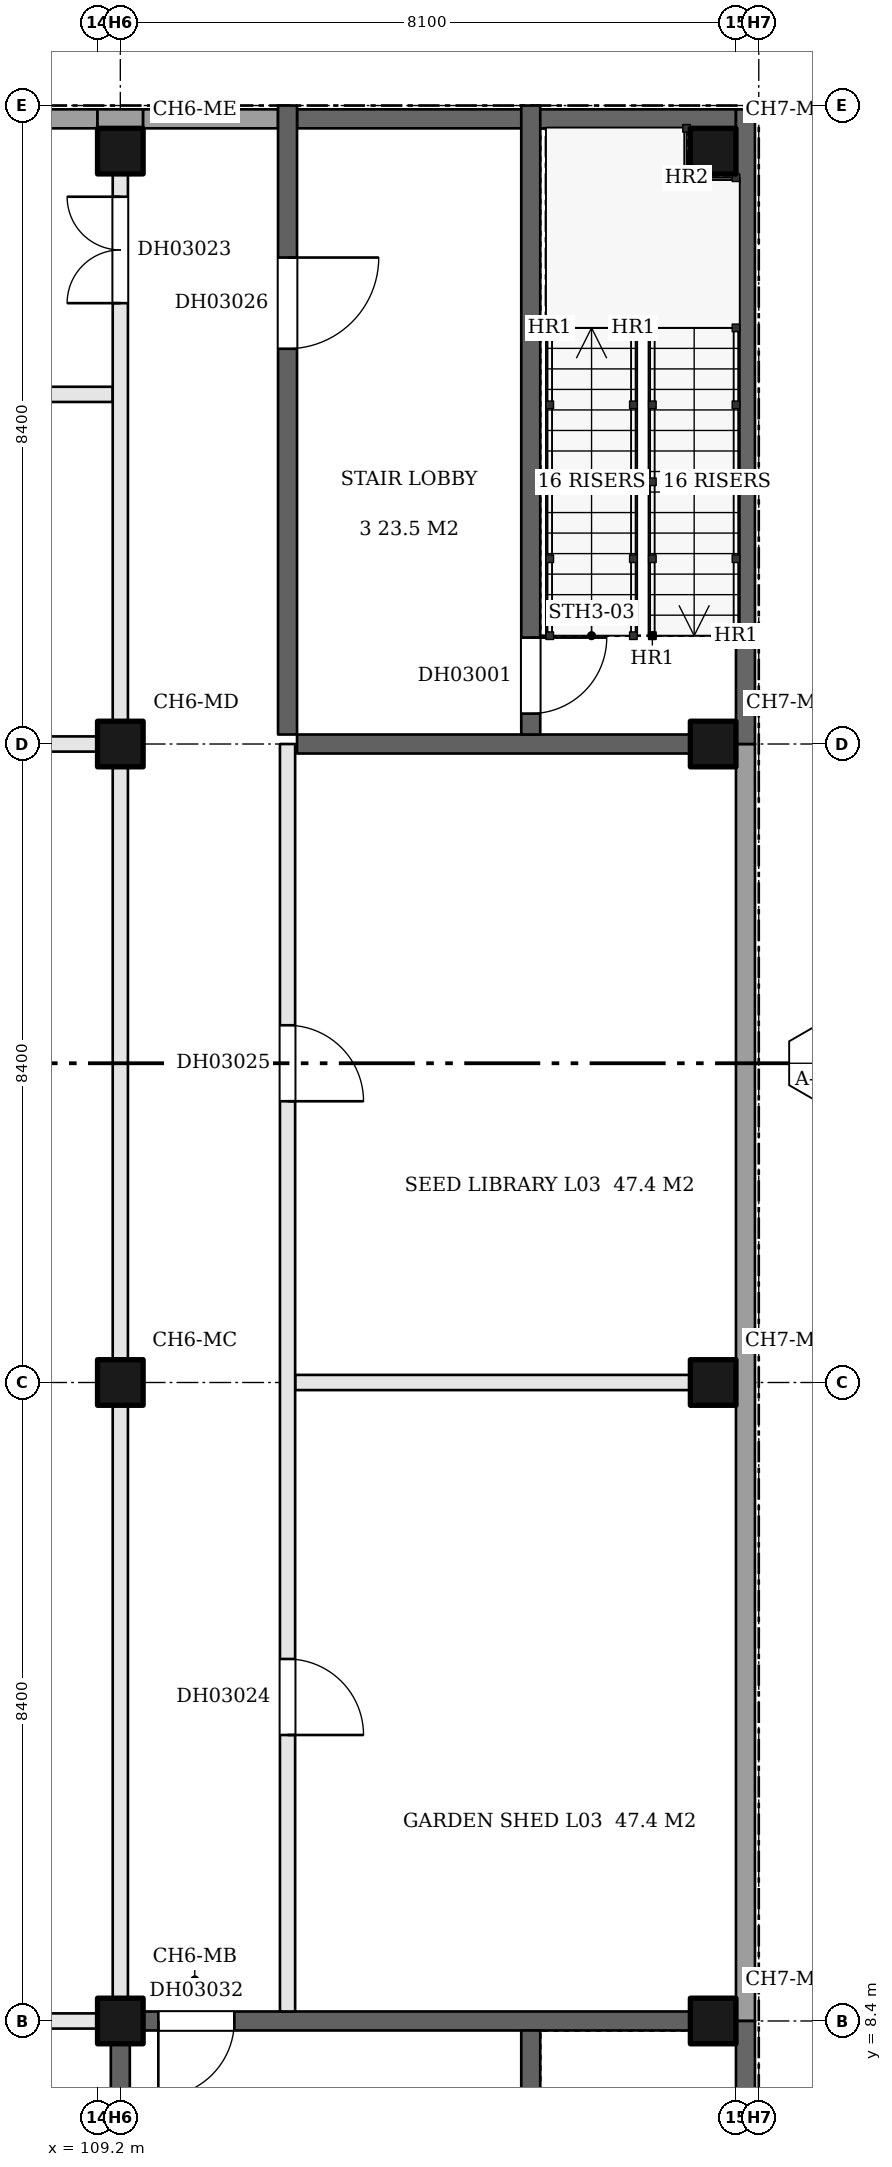
"""IFC4 building model, lengths in metres.
Left out: names, types, materials, properties, quantities, classifications, styles, units other than length and angle.
Written with IfcOpenShell. Run it as: python <this file> out.ifc"""

import sys

from ifc_helpers import new_model, si_unit, direction, frame, frame_2d, origin, origin_2d, place, context, subcontext, project, spatial, rectangle, extrude, element, fill, save


model = new_model("IFC4")
c1 = context("Model", 3, precision=1e-05, world=origin(), true_north=direction((0.0, 1.0)))
c2 = subcontext(c1, "Body", "Model", "MODEL_VIEW")
j1 = project(units=[si_unit("LENGTHUNIT", "METRE"), si_unit("PLANEANGLEUNIT", "RADIAN")], contexts=[c1])
p1 = place(None, origin())
s1 = spatial("IfcSite", under=j1, at=p1, CompositionType="ELEMENT")
p2 = place(p1, origin())
s2 = spatial("IfcBuilding", under=s1, at=p2, CompositionType="ELEMENT")
p3 = place(p2, frame((0.0, 0.0, 19.8)))
s3 = spatial("IfcBuildingStorey", under=s2, at=p3, CompositionType="ELEMENT", Elevation=19.8)
for number, where, z_axis, x_axis in (
    (1, (109.5, 8.4, 0.0), (0.0, 0.0, 1.0), (1.0, 0.0, 0.0)),
    (2, (109.5, 16.8, 0.0), (0.0, 0.0, 1.0), (1.0, 0.0, 0.0)),
    (3, (109.5, 25.2, 0.0), (0.0, 0.0, 1.0), (1.0, 0.0, 0.0)),
    (4, (109.5, 33.0, 0.0), (0.0, 0.0, 1.0), (1.0, 0.0, 0.0)),
    (5, (117.3, 8.4, 0.0), (0.0, 0.0, 1.0), (1.0, 0.0, 0.0)),
    (6, (117.3, 16.8, 0.0), (0.0, 0.0, 1.0), (1.0, 0.0, 0.0)),
    (7, (117.3, 25.2, 0.0), (0.0, 0.0, 1.0), (1.0, 0.0, 0.0)),
    (8, (117.3, 33.0, 0.0), (0.0, 0.0, 1.0), (1.0, 0.0, 0.0)),
):
    element("IfcColumn", number, at=place(p3, frame(where, z_axis=z_axis, x_axis=x_axis)), inside=s3, PredefinedType="COLUMN", context=c2, shape_type="SweptSolid", body=[
        extrude(rectangle(XDim=0.6, YDim=0.6, at=origin_2d()), origin(), (0.0, 0.0, 1.0), 5.0),
    ])
p4 = place(p3, frame((101.4, 8.4, 0.0), z_axis=(0.0, 0.0, 1.0), x_axis=(1.0, 0.0, 0.0)))
e9 = element("IfcWall", 9, at=p4, inside=s3, PredefinedType="PARTITIONING", context=c2, shape_type="SweptSolid", body=[
    extrude(rectangle(XDim=7.8, YDim=0.2, at=frame_2d((3.9, 0.0))), origin(), (0.0, 0.0, 1.0), 5.0),
])
p5 = place(p4, frame((2.2, 0.0, 0.0)))
e10 = element("IfcOpeningElement", 10, at=p5, cuts=e9, PredefinedType="OPENING", context=c2, shape_type="SweptSolid", body=[
    extrude(rectangle(XDim=1.0, YDim=2.1, at=frame_2d((0.5, 1.05))), frame((0.0, 0.11, 0.0), z_axis=(0.0, -1.0, 0.0), x_axis=(1.0, 0.0, 0.0)), (0.0, 0.0, 1.0), 0.22),
])
p6 = place(p4, frame((5.2, 0.0, 0.0)))
e11 = element("IfcOpeningElement", 11, at=p6, cuts=e9, PredefinedType="OPENING", context=c2, shape_type="SweptSolid", body=[
    extrude(rectangle(XDim=1.0, YDim=2.1, at=frame_2d((0.5, 1.05))), frame((0.0, 0.11, 0.0), z_axis=(0.0, -1.0, 0.0), x_axis=(1.0, 0.0, 0.0)), (0.0, 0.0, 1.0), 0.22),
])
p7 = place(p3, frame((109.8, 8.4, 0.0), z_axis=(0.0, 0.0, 1.0), x_axis=(1.0, 0.0, 0.0)))
e12 = element("IfcWall", 12, at=p7, inside=s3, PredefinedType="SHEAR", context=c2, shape_type="SweptSolid", body=[
    extrude(rectangle(XDim=7.2, YDim=0.25, at=frame_2d((3.6, 0.0))), origin(), (0.0, 0.0, 1.0), 5.0),
])
p8 = place(p7, frame((0.2, 0.0, 0.0)))
e13 = element("IfcOpeningElement", 13, at=p8, cuts=e12, PredefinedType="OPENING", context=c2, shape_type="SweptSolid", body=[
    extrude(rectangle(XDim=1.0, YDim=2.1, at=frame_2d((0.5, 1.05))), frame((0.0, 0.135, 0.0), z_axis=(0.0, -1.0, 0.0), x_axis=(1.0, 0.0, 0.0)), (0.0, 0.0, 1.0), 0.27),
])
p9 = place(p3, frame((111.8, 16.8, 0.0), z_axis=(0.0, 0.0, 1.0), x_axis=(1.0, 0.0, 0.0)))
e14 = element("IfcWall", 14, at=p9, inside=s3, PredefinedType="PARTITIONING", context=c2, shape_type="SweptSolid", body=[
    extrude(rectangle(XDim=5.2, YDim=0.2, at=frame_2d((2.6, 0.0))), origin(), (0.0, 0.0, 1.0), 5.0),
])
p10 = place(p3, frame((101.4, 25.2, 0.0), z_axis=(0.0, 0.0, 1.0), x_axis=(1.0, 0.0, 0.0)))
e15 = element("IfcWall", 15, at=p10, inside=s3, PredefinedType="PARTITIONING", context=c2, shape_type="SweptSolid", body=[
    extrude(rectangle(XDim=7.8, YDim=0.2, at=frame_2d((3.9, 0.0))), origin(), (0.0, 0.0, 1.0), 5.0),
])
p11 = place(p3, frame((111.825, 25.2, 0.0), z_axis=(0.0, 0.0, 1.0), x_axis=(1.0, 0.0, 0.0)))
e16 = element("IfcWall", 16, at=p11, inside=s3, PredefinedType="SHEAR", context=c2, shape_type="SweptSolid", body=[
    extrude(rectangle(XDim=5.175, YDim=0.25, at=frame_2d((2.587, 0.0))), origin(), (0.0, 0.0, 1.0), 5.0),
])
p12 = place(p3, frame((76.025, 29.8, 0.0), z_axis=(0.0, 0.0, 1.0), x_axis=(1.0, 0.0, 0.0)))
e17 = element("IfcWall", 17, at=p12, inside=s3, PredefinedType="PARTITIONING", context=c2, shape_type="SweptSolid", body=[
    extrude(rectangle(XDim=33.375, YDim=0.2, at=frame_2d((16.688, 0.0))), origin(), (0.0, 0.0, 1.0), 5.0),
])
p13 = place(p12, frame((1.538, 0.0, 0.0)))
e18 = element("IfcOpeningElement", 18, at=p13, cuts=e17, PredefinedType="OPENING", context=c2, shape_type="SweptSolid", body=[
    extrude(rectangle(XDim=1.0, YDim=2.1, at=frame_2d((0.5, 1.05))), frame((0.0, 0.11, 0.0), z_axis=(0.0, -1.0, 0.0), x_axis=(1.0, 0.0, 0.0)), (0.0, 0.0, 1.0), 0.22),
])
p14 = place(p12, frame((5.675, 0.0, 0.0)))
e19 = element("IfcOpeningElement", 19, at=p14, cuts=e17, PredefinedType="OPENING", context=c2, shape_type="SweptSolid", body=[
    extrude(rectangle(XDim=1.0, YDim=2.1, at=frame_2d((0.5, 1.05))), frame((0.0, 0.11, 0.0), z_axis=(0.0, -1.0, 0.0), x_axis=(1.0, 0.0, 0.0)), (0.0, 0.0, 1.0), 0.22),
])
p15 = place(p12, frame((9.175, 0.0, 0.0)))
e20 = element("IfcOpeningElement", 20, at=p15, cuts=e17, PredefinedType="OPENING", context=c2, shape_type="SweptSolid", body=[
    extrude(rectangle(XDim=1.0, YDim=2.1, at=frame_2d((0.5, 1.05))), frame((0.0, 0.11, 0.0), z_axis=(0.0, -1.0, 0.0), x_axis=(1.0, 0.0, 0.0)), (0.0, 0.0, 1.0), 0.22),
])
p16 = place(p12, frame((14.775, 0.0, 0.0)))
e21 = element("IfcOpeningElement", 21, at=p16, cuts=e17, PredefinedType="OPENING", context=c2, shape_type="SweptSolid", body=[
    extrude(rectangle(XDim=1.0, YDim=2.1, at=frame_2d((0.5, 1.05))), frame((0.0, 0.11, 0.0), z_axis=(0.0, -1.0, 0.0), x_axis=(1.0, 0.0, 0.0)), (0.0, 0.0, 1.0), 0.22),
])
p17 = place(p12, frame((22.475, 0.0, 0.0)))
e22 = element("IfcOpeningElement", 22, at=p17, cuts=e17, PredefinedType="OPENING", context=c2, shape_type="SweptSolid", body=[
    extrude(rectangle(XDim=1.0, YDim=2.1, at=frame_2d((0.5, 1.05))), frame((0.0, 0.11, 0.0), z_axis=(0.0, -1.0, 0.0), x_axis=(1.0, 0.0, 0.0)), (0.0, 0.0, 1.0), 0.22),
])
p18 = place(p12, frame((29.475, 0.0, 0.0)))
e23 = element("IfcOpeningElement", 23, at=p18, cuts=e17, PredefinedType="OPENING", context=c2, shape_type="SweptSolid", body=[
    extrude(rectangle(XDim=1.0, YDim=2.1, at=frame_2d((0.5, 1.05))), frame((0.0, 0.11, 0.0), z_axis=(0.0, -1.0, 0.0), x_axis=(1.0, 0.0, 0.0)), (0.0, 0.0, 1.0), 0.22),
])
p19 = place(p3, frame((101.4, 33.425, 0.0), z_axis=(0.0, 0.0, 1.0), x_axis=(1.0, 0.0, 0.0)))
e24 = element("IfcWall", 24, at=p19, inside=s3, PredefinedType="SOLIDWALL", context=c2, shape_type="SweptSolid", body=[
    extrude(rectangle(XDim=7.8, YDim=0.25, at=frame_2d((3.9, 0.0))), origin(), (0.0, 0.0, 1.0), 5.0),
])
p20 = place(p19, frame((0.75, 0.0, 0.9)))
e25 = element("IfcOpeningElement", 25, at=p20, cuts=e24, PredefinedType="OPENING", context=c2, shape_type="SweptSolid", body=[
    extrude(rectangle(XDim=2.4, YDim=1.5, at=frame_2d((1.2, 0.75))), frame((0.0, 0.135, 0.0), z_axis=(0.0, -1.0, 0.0), x_axis=(1.0, 0.0, 0.0)), (0.0, 0.0, 1.0), 0.27),
])
p21 = place(p19, frame((4.65, 0.0, 0.9)))
e26 = element("IfcOpeningElement", 26, at=p21, cuts=e24, PredefinedType="OPENING", context=c2, shape_type="SweptSolid", body=[
    extrude(rectangle(XDim=2.4, YDim=1.5, at=frame_2d((1.2, 0.75))), frame((0.0, 0.135, 0.0), z_axis=(0.0, -1.0, 0.0), x_axis=(1.0, 0.0, 0.0)), (0.0, 0.0, 1.0), 0.27),
])
p22 = place(p3, frame((109.2, 33.425, 0.0), z_axis=(0.0, 0.0, 1.0), x_axis=(1.0, 0.0, 0.0)))
e27 = element("IfcWall", 27, at=p22, inside=s3, PredefinedType="SOLIDWALL", context=c2, shape_type="SweptSolid", body=[
    extrude(rectangle(XDim=0.6, YDim=0.25, at=frame_2d((0.3, 0.0))), origin(), (0.0, 0.0, 1.0), 5.0),
])
p23 = place(p3, frame((109.8, 33.425, 0.0), z_axis=(0.0, 0.0, 1.0), x_axis=(1.0, 0.0, 0.0)))
e28 = element("IfcWall", 28, at=p23, inside=s3, PredefinedType="SOLIDWALL", context=c2, shape_type="SweptSolid", body=[
    extrude(rectangle(XDim=1.775, YDim=0.25, at=frame_2d((0.887, 0.0))), origin(), (0.0, 0.0, 1.0), 5.0),
])
p24 = place(p3, frame((111.825, 33.425, 0.0), z_axis=(0.0, 0.0, 1.0), x_axis=(1.0, 0.0, 0.0)))
e29 = element("IfcWall", 29, at=p24, inside=s3, PredefinedType="SHEAR", context=c2, shape_type="SweptSolid", body=[
    extrude(rectangle(XDim=5.775, YDim=0.25, at=frame_2d((2.888, 0.0))), origin(), (0.0, 0.0, 1.0), 5.0),
])
p25 = place(p3, frame((109.5, 0.9, 0.0), z_axis=(0.0, 0.0, 1.0), x_axis=(0.0, 1.0, 0.0)))
e30 = element("IfcWall", 30, at=p25, inside=s3, PredefinedType="SHEAR", context=c2, shape_type="SweptSolid", body=[
    extrude(rectangle(XDim=7.2, YDim=0.25, at=frame_2d((3.6, 0.0))), origin(), (0.0, 0.0, 1.0), 5.0),
])
p26 = place(p25, frame((4.3, 0.0, 0.0)))
e31 = element("IfcOpeningElement", 31, at=p26, cuts=e30, PredefinedType="OPENING", context=c2, shape_type="SweptSolid", body=[
    extrude(rectangle(XDim=1.4, YDim=2.1, at=frame_2d((0.7, 1.05))), frame((0.0, 0.135, 0.0), z_axis=(0.0, -1.0, 0.0), x_axis=(1.0, 0.0, 0.0)), (0.0, 0.0, 1.0), 0.27),
])
p27 = place(p3, frame((109.5, 8.7, 0.0), z_axis=(0.0, 0.0, 1.0), x_axis=(0.0, 1.0, 0.0)))
e32 = element("IfcWall", 32, at=p27, inside=s3, PredefinedType="PARTITIONING", context=c2, shape_type="SweptSolid", body=[
    extrude(rectangle(XDim=7.8, YDim=0.2, at=frame_2d((3.9, 0.0))), origin(), (0.0, 0.0, 1.0), 5.0),
])
p28 = place(p3, frame((109.5, 17.1, 0.0), z_axis=(0.0, 0.0, 1.0), x_axis=(0.0, 1.0, 0.0)))
e33 = element("IfcWall", 33, at=p28, inside=s3, PredefinedType="PARTITIONING", context=c2, shape_type="SweptSolid", body=[
    extrude(rectangle(XDim=7.8, YDim=0.2, at=frame_2d((3.9, 0.0))), origin(), (0.0, 0.0, 1.0), 5.0),
])
p29 = place(p3, frame((109.5, 25.5, 0.0), z_axis=(0.0, 0.0, 1.0), x_axis=(0.0, 1.0, 0.0)))
e34 = element("IfcWall", 34, at=p29, inside=s3, PredefinedType="PARTITIONING", context=c2, shape_type="SweptSolid", body=[
    extrude(rectangle(XDim=7.2, YDim=0.2, at=frame_2d((3.6, 0.0))), origin(), (0.0, 0.0, 1.0), 5.0),
])
p30 = place(p29, frame((5.5, 0.0, 0.0)))
e35 = element("IfcOpeningElement", 35, at=p30, cuts=e34, PredefinedType="OPENING", context=c2, shape_type="SweptSolid", body=[
    extrude(rectangle(XDim=1.4, YDim=2.1, at=frame_2d((0.7, 1.05))), frame((0.0, 0.11, 0.0), z_axis=(0.0, -1.0, 0.0), x_axis=(1.0, 0.0, 0.0)), (0.0, 0.0, 1.0), 0.22),
])
p31 = place(p3, frame((111.7, 8.525, 0.0), z_axis=(0.0, 0.0, 1.0), x_axis=(0.0, 1.0, 0.0)))
e36 = element("IfcWall", 36, at=p31, inside=s3, PredefinedType="PARTITIONING", context=c2, shape_type="SweptSolid", body=[
    extrude(rectangle(XDim=16.675, YDim=0.2, at=frame_2d((8.337, 0.0))), origin(), (0.0, 0.0, 1.0), 5.0),
])
p32 = place(p31, frame((3.637, 0.0, 0.0)))
e37 = element("IfcOpeningElement", 37, at=p32, cuts=e36, PredefinedType="OPENING", context=c2, shape_type="SweptSolid", body=[
    extrude(rectangle(XDim=1.0, YDim=2.1, at=frame_2d((0.5, 1.05))), frame((0.0, 0.11, 0.0), z_axis=(0.0, -1.0, 0.0), x_axis=(1.0, 0.0, 0.0)), (0.0, 0.0, 1.0), 0.22),
])
p33 = place(p31, frame((11.975, 0.0, 0.0)))
e38 = element("IfcOpeningElement", 38, at=p33, cuts=e36, PredefinedType="OPENING", context=c2, shape_type="SweptSolid", body=[
    extrude(rectangle(XDim=1.0, YDim=2.1, at=frame_2d((0.5, 1.05))), frame((0.0, 0.11, 0.0), z_axis=(0.0, -1.0, 0.0), x_axis=(1.0, 0.0, 0.0)), (0.0, 0.0, 1.0), 0.22),
])
p34 = place(p3, frame((111.7, 25.325, 0.0), z_axis=(0.0, 0.0, 1.0), x_axis=(0.0, 1.0, 0.0)))
e39 = element("IfcWall", 39, at=p34, inside=s3, PredefinedType="SHEAR", context=c2, shape_type="SweptSolid", body=[
    extrude(rectangle(XDim=8.275, YDim=0.25, at=frame_2d((4.138, 0.0))), origin(), (0.0, 0.0, 1.0), 5.0),
])
p35 = place(p34, frame((5.075, 0.0, 0.0)))
e40 = element("IfcOpeningElement", 40, at=p35, cuts=e39, PredefinedType="OPENING", context=c2, shape_type="SweptSolid", body=[
    extrude(rectangle(XDim=1.2, YDim=2.1, at=frame_2d((0.6, 1.05))), frame((0.0, 0.135, 0.0), z_axis=(0.0, -1.0, 0.0), x_axis=(1.0, 0.0, 0.0)), (0.0, 0.0, 1.0), 0.27),
])
p36 = place(p3, frame((114.9, 3.125, 0.0), z_axis=(0.0, 0.0, 1.0), x_axis=(0.0, 1.0, 0.0)))
e41 = element("IfcWall", 41, at=p36, inside=s3, PredefinedType="SHEAR", context=c2, shape_type="SweptSolid", body=[
    extrude(rectangle(XDim=5.15, YDim=0.25, at=frame_2d((2.575, 0.0))), origin(), (0.0, 0.0, 1.0), 5.0),
])
p37 = place(p36, frame((3.075, 0.0, 0.0)))
e42 = element("IfcOpeningElement", 42, at=p37, cuts=e41, PredefinedType="OPENING", context=c2, shape_type="SweptSolid", body=[
    extrude(rectangle(XDim=1.1, YDim=2.1, at=frame_2d((0.55, 1.05))), frame((0.0, 0.135, 0.0), z_axis=(0.0, -1.0, 0.0), x_axis=(1.0, 0.0, 0.0)), (0.0, 0.0, 1.0), 0.27),
])
p38 = place(p36, frame((0.475, 0.0, 0.0)))
e43 = element("IfcOpeningElement", 43, at=p38, cuts=e41, PredefinedType="OPENING", context=c2, shape_type="SweptSolid", body=[
    extrude(rectangle(XDim=0.9, YDim=2.1, at=frame_2d((0.45, 1.05))), frame((0.0, 0.135, 0.0), z_axis=(0.0, -1.0, 0.0), x_axis=(1.0, 0.0, 0.0)), (0.0, 0.0, 1.0), 0.27),
])
p39 = place(p3, frame((114.9, 25.325, 0.0), z_axis=(0.0, 0.0, 1.0), x_axis=(0.0, 1.0, 0.0)))
e44 = element("IfcWall", 44, at=p39, inside=s3, PredefinedType="SHEAR", context=c2, shape_type="SweptSolid", body=[
    extrude(rectangle(XDim=8.275, YDim=0.25, at=frame_2d((4.138, 0.0))), origin(), (0.0, 0.0, 1.0), 5.0),
])
p40 = place(p39, frame((0.275, 0.0, 0.0)))
e45 = element("IfcOpeningElement", 45, at=p40, cuts=e44, PredefinedType="OPENING", context=c2, shape_type="SweptSolid", body=[
    extrude(rectangle(XDim=1.0, YDim=2.1, at=frame_2d((0.5, 1.05))), frame((0.0, 0.135, 0.0), z_axis=(0.0, -1.0, 0.0), x_axis=(1.0, 0.0, 0.0)), (0.0, 0.0, 1.0), 0.27),
])
p41 = place(p3, frame((117.725, 0.05, 0.0), z_axis=(0.0, 0.0, 1.0), x_axis=(0.0, 1.0, 0.0)))
e46 = element("IfcWall", 46, at=p41, inside=s3, PredefinedType="SHEAR", context=c2, shape_type="SweptSolid", body=[
    extrude(rectangle(XDim=8.35, YDim=0.25, at=frame_2d((4.175, 0.0))), origin(), (0.0, 0.0, 1.0), 5.0),
])
p42 = place(p3, frame((117.725, 8.4, 0.0), z_axis=(0.0, 0.0, 1.0), x_axis=(0.0, 1.0, 0.0)))
e47 = element("IfcWall", 47, at=p42, inside=s3, PredefinedType="SOLIDWALL", context=c2, shape_type="SweptSolid", body=[
    extrude(rectangle(XDim=16.8, YDim=0.25, at=frame_2d((8.4, 0.0))), origin(), (0.0, 0.0, 1.0), 5.0),
])
p43 = place(p3, frame((117.725, 25.2, 0.0), z_axis=(0.0, 0.0, 1.0), x_axis=(0.0, 1.0, 0.0)))
e48 = element("IfcWall", 48, at=p43, inside=s3, PredefinedType="SHEAR", context=c2, shape_type="SweptSolid", body=[
    extrude(rectangle(XDim=8.35, YDim=0.25, at=frame_2d((4.175, 0.0))), origin(), (0.0, 0.0, 1.0), 5.0),
])
p44 = place(p40, frame((1.0, 0.0, 0.0), z_axis=(0.0, 0.0, 1.0), x_axis=(-1.0, 0.0, 0.0)))
e49 = element("IfcDoor", 49, at=p44, inside=s3, OperationType="SINGLE_SWING_LEFT", PredefinedType="DOOR", context=c2, shape_type="SweptSolid", body=[
    extrude(rectangle(XDim=1.0, YDim=2.1, at=frame_2d((0.5, 1.05))), frame((0.0, 0.025, 0.0), z_axis=(0.0, -1.0, 0.0), x_axis=(1.0, 0.0, 0.0)), (0.0, 0.0, 1.0), 0.05),
])
fill(e45, e49)
p45 = place(p30, origin())
e50 = element("IfcDoor", 50, at=p45, inside=s3, OperationType="DOUBLE_DOOR_SINGLE_SWING", PredefinedType="DOOR", context=c2, shape_type="SweptSolid", body=[
    extrude(rectangle(XDim=1.4, YDim=2.1, at=frame_2d((0.7, 1.05))), frame((0.0, 0.025, 0.0), z_axis=(0.0, -1.0, 0.0), x_axis=(1.0, 0.0, 0.0)), (0.0, 0.0, 1.0), 0.05),
])
fill(e35, e50)
p46 = place(p32, frame((1.0, 0.0, 0.0), z_axis=(0.0, 0.0, 1.0), x_axis=(-1.0, 0.0, 0.0)))
e51 = element("IfcDoor", 51, at=p46, inside=s3, OperationType="SINGLE_SWING_RIGHT", PredefinedType="DOOR", context=c2, shape_type="SweptSolid", body=[
    extrude(rectangle(XDim=1.0, YDim=2.1, at=frame_2d((0.5, 1.05))), frame((0.0, 0.025, 0.0), z_axis=(0.0, -1.0, 0.0), x_axis=(1.0, 0.0, 0.0)), (0.0, 0.0, 1.0), 0.05),
])
fill(e37, e51)
p47 = place(p33, frame((1.0, 0.0, 0.0), z_axis=(0.0, 0.0, 1.0), x_axis=(-1.0, 0.0, 0.0)))
e52 = element("IfcDoor", 52, at=p47, inside=s3, OperationType="SINGLE_SWING_RIGHT", PredefinedType="DOOR", context=c2, shape_type="SweptSolid", body=[
    extrude(rectangle(XDim=1.0, YDim=2.1, at=frame_2d((0.5, 1.05))), frame((0.0, 0.025, 0.0), z_axis=(0.0, -1.0, 0.0), x_axis=(1.0, 0.0, 0.0)), (0.0, 0.0, 1.0), 0.05),
])
fill(e38, e52)
p48 = place(p35, frame((1.2, 0.0, 0.0), z_axis=(0.0, 0.0, 1.0), x_axis=(-1.0, 0.0, 0.0)))
e53 = element("IfcDoor", 53, at=p48, inside=s3, OperationType="SINGLE_SWING_LEFT", PredefinedType="DOOR", context=c2, shape_type="SweptSolid", body=[
    extrude(rectangle(XDim=1.2, YDim=2.1, at=frame_2d((0.6, 1.05))), frame((0.0, 0.025, 0.0), z_axis=(0.0, -1.0, 0.0), x_axis=(1.0, 0.0, 0.0)), (0.0, 0.0, 1.0), 0.05),
])
fill(e40, e53)
p49 = place(p8, frame((1.0, 0.0, 0.0), z_axis=(0.0, 0.0, 1.0), x_axis=(-1.0, 0.0, 0.0)))
e54 = element("IfcDoor", 54, at=p49, inside=s3, OperationType="SINGLE_SWING_RIGHT", PredefinedType="DOOR", context=c2, shape_type="SweptSolid", body=[
    extrude(rectangle(XDim=1.0, YDim=2.1, at=frame_2d((0.5, 1.05))), frame((0.0, 0.025, 0.0), z_axis=(0.0, -1.0, 0.0), x_axis=(1.0, 0.0, 0.0)), (0.0, 0.0, 1.0), 0.05),
])
fill(e13, e54)
save(model, sys.argv[1])
